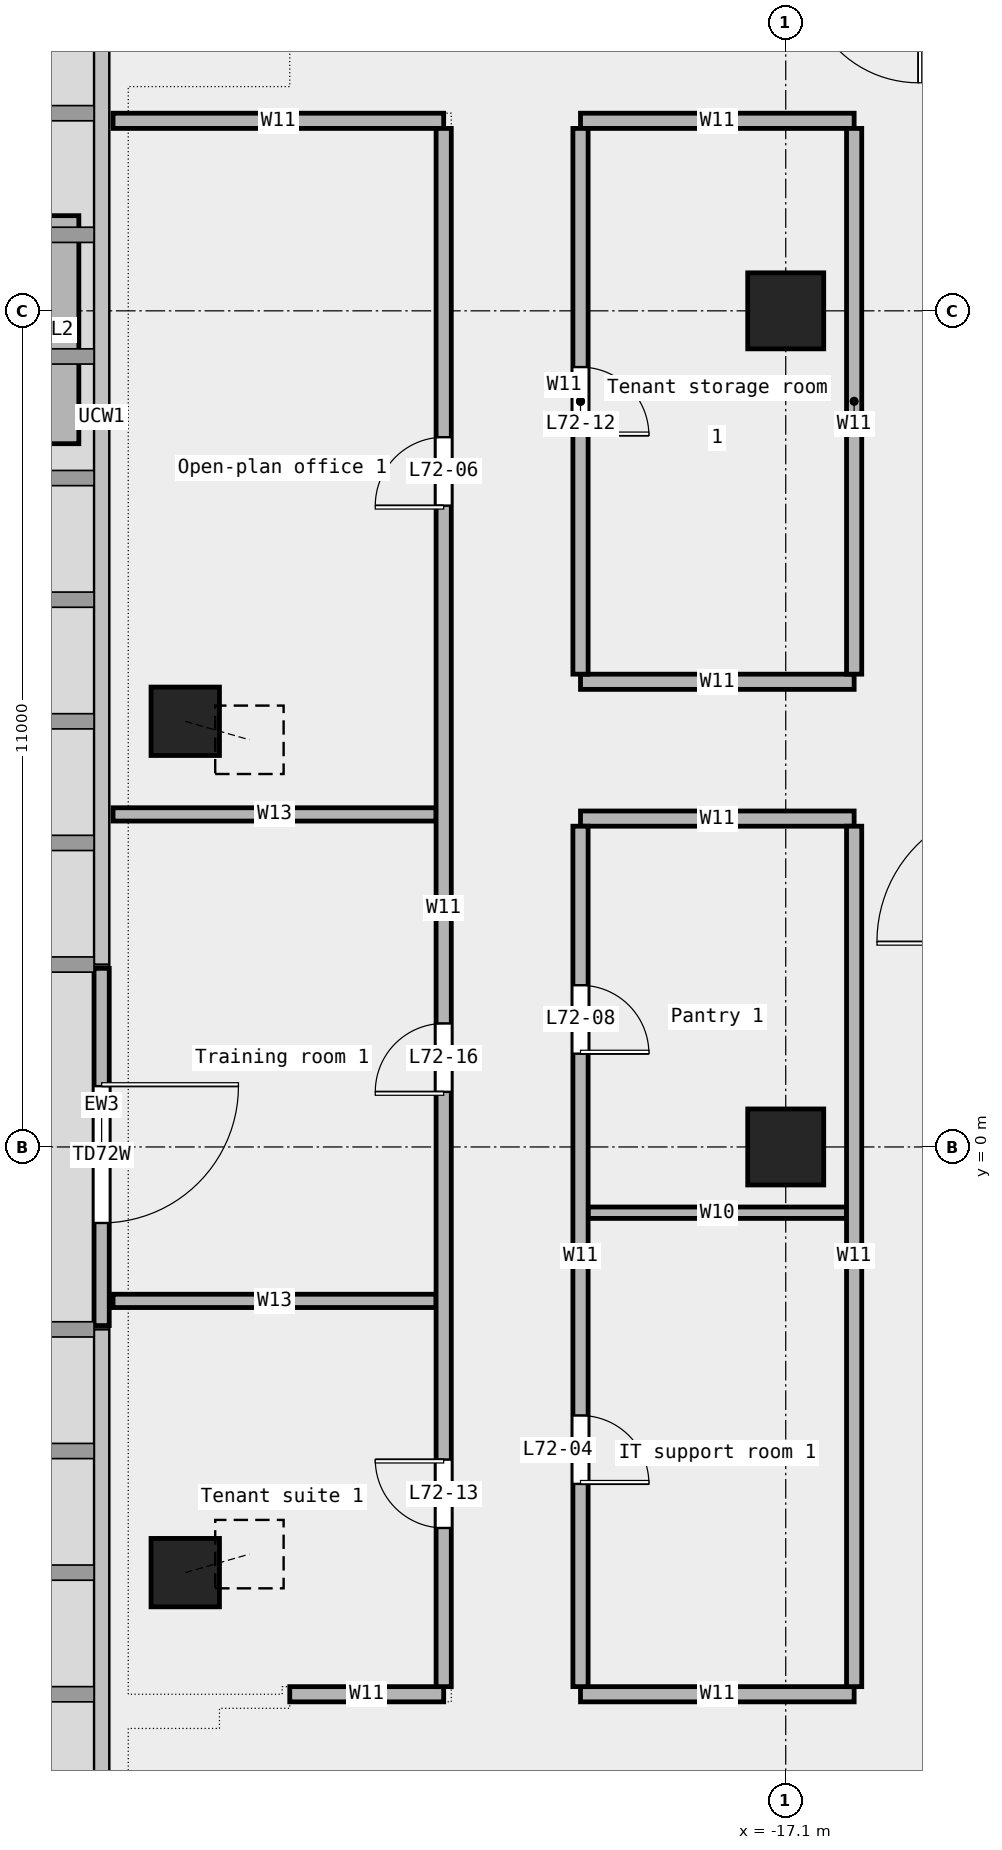
"""IFC4 building model, lengths in metres.
Left out: names, types, materials, properties, quantities, classifications, styles, units other than length and angle.
Written with IfcOpenShell. Run it as: python <this file> out.ifc"""

import sys

from ifc_helpers import new_model, si_unit, direction, frame, frame_2d, origin, origin_2d, place, context, subcontext, project, spatial, rectangle, extrude, element, fill, save


model = new_model("IFC4")
c1 = context("Model", 3, precision=1e-05, world=origin(), true_north=direction((0.0, 1.0)))
c2 = subcontext(c1, "Body", "Model", "MODEL_VIEW")
j1 = project(units=[si_unit("LENGTHUNIT", "METRE"), si_unit("PLANEANGLEUNIT", "RADIAN")], contexts=[c1])
p1 = place(None, origin())
s1 = spatial("IfcSite", under=j1, at=p1, CompositionType="ELEMENT")
p2 = place(p1, origin())
s2 = spatial("IfcBuilding", under=s1, at=p2, CompositionType="ELEMENT")
p3 = place(p2, frame((0.0, 0.0, 329.4)))
s3 = spatial("IfcBuildingStorey", under=s2, at=p3, CompositionType="ELEMENT", Elevation=329.4)
for number, where, z_axis, x_axis in (
    (1, (-25.0, 5.6, 0.0), (0.225, -0.065, 0.972), (0.277, 0.961, 0.0)),
    (2, (-25.0, -5.6, 0.0), (0.225, 0.065, 0.972), (-0.277, 0.961, 0.0)),
):
    element("IfcColumn", number, at=place(p3, frame(where, z_axis=z_axis, x_axis=x_axis)), inside=s3, PredefinedType="COLUMN", context=c2, shape_type="SweptSolid", body=[
        extrude(rectangle(XDim=0.9, YDim=0.9, at=origin_2d()), origin(), (0.0, 0.0, 1.0), 3.754),
    ])
for number, where, z_axis, x_axis in (
    (3, (-17.1, 0.0, 0.0), (0.0, 0.0, 1.0), (1.0, 0.0, 0.0)),
    (4, (-17.1, 11.0, 0.0), (0.0, 0.0, 1.0), (1.0, 0.0, 0.0)),
):
    element("IfcColumn", number, at=place(p3, frame(where, z_axis=z_axis, x_axis=x_axis)), inside=s3, PredefinedType="COLUMN", context=c2, shape_type="SweptSolid", body=[
        extrude(rectangle(XDim=1.0, YDim=1.0, at=origin_2d()), origin(), (0.0, 0.0, 1.0), 3.65),
    ])
p4 = place(p3, frame((-26.1, 2.35, 0.0), z_axis=(0.0, 0.0, 1.0), x_axis=(0.0, -1.0, 0.0)))
e5 = element("IfcWall", 5, at=p4, inside=s3, PredefinedType="STANDARD", context=c2, shape_type="SweptSolid", body=[
    extrude(rectangle(XDim=4.7, YDim=0.2, at=frame_2d((2.35, 0.0))), origin(), (0.0, 0.0, 1.0), 3.65),
])
p5 = place(p4, frame((1.55, 0.0, 0.0)))
e6 = element("IfcOpeningElement", 6, at=p5, cuts=e5, PredefinedType="OPENING", context=c2, shape_type="SweptSolid", body=[
    extrude(rectangle(XDim=1.8, YDim=2.4, at=frame_2d((0.9, 1.2))), frame((0.0, 0.112, 0.0), z_axis=(0.0, -1.0, 0.0), x_axis=(1.0, 0.0, 0.0)), (0.0, 0.0, 1.0), 0.224),
])
p6 = place(p3, frame((-26.7, 12.252, 0.0), z_axis=(0.0, 0.0, 1.0), x_axis=(0.0, -1.0, 0.0)))
e7 = element("IfcWall", 7, at=p6, inside=s3, PredefinedType="STANDARD", context=c2, shape_type="SweptSolid", body=[
    extrude(rectangle(XDim=3.0, YDim=0.6, at=frame_2d((1.5, 0.0))), origin(), (0.0, 0.0, 1.0), 0.7),
])
p7 = place(p3, frame((-23.625, -7.2, 0.0), z_axis=(0.0, 0.0, 1.0), x_axis=(1.0, 0.0, 0.0)))
e8 = element("IfcWall", 8, at=p7, inside=s3, PredefinedType="PARTITIONING", context=c2, shape_type="SweptSolid", body=[
    extrude(rectangle(XDim=2.025, YDim=0.2, at=frame_2d((1.012, 0.0))), origin(), (0.0, 0.0, 1.0), 3.65),
])
p8 = place(p3, frame((-19.8, -7.2, 0.0), z_axis=(0.0, 0.0, 1.0), x_axis=(1.0, 0.0, 0.0)))
e9 = element("IfcWall", 9, at=p8, inside=s3, PredefinedType="PARTITIONING", context=c2, shape_type="SweptSolid", body=[
    extrude(rectangle(XDim=3.6, YDim=0.2, at=frame_2d((1.8, 0.0))), origin(), (0.0, 0.0, 1.0), 3.65),
])
p9 = place(p3, frame((-25.95, -2.025, 0.0), z_axis=(0.0, 0.0, 1.0), x_axis=(1.0, 0.0, 0.0)))
e10 = element("IfcWall", 10, at=p9, inside=s3, PredefinedType="PARTITIONING", context=c2, shape_type="SweptSolid", body=[
    extrude(rectangle(XDim=4.25, YDim=0.175, at=frame_2d((2.125, 0.0))), origin(), (0.0, 0.0, 1.0), 3.65),
])
p10 = place(p3, frame((-19.7, -0.865, 0.0), z_axis=(0.0, 0.0, 1.0), x_axis=(1.0, 0.0, 0.0)))
e11 = element("IfcWall", 11, at=p10, inside=s3, PredefinedType="PARTITIONING", context=c2, shape_type="SweptSolid", body=[
    extrude(rectangle(XDim=3.4, YDim=0.15, at=frame_2d((1.7, 0.0))), origin(), (0.0, 0.0, 1.0), 3.65),
])
p11 = place(p3, frame((-19.8, 4.32, 0.0), z_axis=(0.0, 0.0, 1.0), x_axis=(1.0, 0.0, 0.0)))
e12 = element("IfcWall", 12, at=p11, inside=s3, PredefinedType="PARTITIONING", context=c2, shape_type="SweptSolid", body=[
    extrude(rectangle(XDim=3.6, YDim=0.2, at=frame_2d((1.8, 0.0))), origin(), (0.0, 0.0, 1.0), 3.65),
])
p12 = place(p3, frame((-25.95, 4.375, 0.0), z_axis=(0.0, 0.0, 1.0), x_axis=(1.0, 0.0, 0.0)))
e13 = element("IfcWall", 13, at=p12, inside=s3, PredefinedType="PARTITIONING", context=c2, shape_type="SweptSolid", body=[
    extrude(rectangle(XDim=4.25, YDim=0.175, at=frame_2d((2.125, 0.0))), origin(), (0.0, 0.0, 1.0), 3.65),
])
p13 = place(p3, frame((-19.8, 6.12, 0.0), z_axis=(0.0, 0.0, 1.0), x_axis=(1.0, 0.0, 0.0)))
e14 = element("IfcWall", 14, at=p13, inside=s3, PredefinedType="PARTITIONING", context=c2, shape_type="SweptSolid", body=[
    extrude(rectangle(XDim=3.6, YDim=0.2, at=frame_2d((1.8, 0.0))), origin(), (0.0, 0.0, 1.0), 3.65),
])
p14 = place(p3, frame((-25.95, 13.5, 0.0), z_axis=(0.0, 0.0, 1.0), x_axis=(1.0, 0.0, 0.0)))
e15 = element("IfcWall", 15, at=p14, inside=s3, PredefinedType="PARTITIONING", context=c2, shape_type="SweptSolid", body=[
    extrude(rectangle(XDim=4.35, YDim=0.2, at=frame_2d((2.175, 0.0))), origin(), (0.0, 0.0, 1.0), 3.65),
])
p15 = place(p3, frame((-19.8, 13.5, 0.0), z_axis=(0.0, 0.0, 1.0), x_axis=(1.0, 0.0, 0.0)))
e16 = element("IfcWall", 16, at=p15, inside=s3, PredefinedType="PARTITIONING", context=c2, shape_type="SweptSolid", body=[
    extrude(rectangle(XDim=3.6, YDim=0.2, at=frame_2d((1.8, 0.0))), origin(), (0.0, 0.0, 1.0), 3.65),
])
p16 = place(p3, frame((-21.6, -7.1, 0.0), z_axis=(0.0, 0.0, 1.0), x_axis=(0.0, 1.0, 0.0)))
e17 = element("IfcWall", 17, at=p16, inside=s3, PredefinedType="PARTITIONING", context=c2, shape_type="SweptSolid", body=[
    extrude(rectangle(XDim=20.5, YDim=0.2, at=frame_2d((10.25, 0.0))), origin(), (0.0, 0.0, 1.0), 3.65),
])
p17 = place(p16, frame((15.538, 0.0, 0.0)))
e18 = element("IfcOpeningElement", 18, at=p17, cuts=e17, PredefinedType="OPENING", context=c2, shape_type="SweptSolid", body=[
    extrude(rectangle(XDim=0.9, YDim=2.1, at=frame_2d((0.45, 1.05))), frame((0.0, 0.112, 0.0), z_axis=(0.0, -1.0, 0.0), x_axis=(1.0, 0.0, 0.0)), (0.0, 0.0, 1.0), 0.224),
])
p18 = place(p16, frame((2.087, 0.0, 0.0)))
e19 = element("IfcOpeningElement", 19, at=p18, cuts=e17, PredefinedType="OPENING", context=c2, shape_type="SweptSolid", body=[
    extrude(rectangle(XDim=0.9, YDim=2.1, at=frame_2d((0.45, 1.05))), frame((0.0, 0.112, 0.0), z_axis=(0.0, -1.0, 0.0), x_axis=(1.0, 0.0, 0.0)), (0.0, 0.0, 1.0), 0.224),
])
p19 = place(p16, frame((7.825, 0.0, 0.0)))
e20 = element("IfcOpeningElement", 20, at=p19, cuts=e17, PredefinedType="OPENING", context=c2, shape_type="SweptSolid", body=[
    extrude(rectangle(XDim=0.9, YDim=2.1, at=frame_2d((0.45, 1.05))), frame((0.0, 0.112, 0.0), z_axis=(0.0, -1.0, 0.0), x_axis=(1.0, 0.0, 0.0)), (0.0, 0.0, 1.0), 0.224),
])
p20 = place(p3, frame((-19.8, -7.1, 0.0), z_axis=(0.0, 0.0, 1.0), x_axis=(0.0, 1.0, 0.0)))
e21 = element("IfcWall", 21, at=p20, inside=s3, PredefinedType="PARTITIONING", context=c2, shape_type="SweptSolid", body=[
    extrude(rectangle(XDim=11.32, YDim=0.2, at=frame_2d((5.66, 0.0))), origin(), (0.0, 0.0, 1.0), 3.65),
])
p21 = place(p20, frame((2.667, 0.0, 0.0)))
e22 = element("IfcOpeningElement", 22, at=p21, cuts=e21, PredefinedType="OPENING", context=c2, shape_type="SweptSolid", body=[
    extrude(rectangle(XDim=0.9, YDim=2.1, at=frame_2d((0.45, 1.05))), frame((0.0, 0.112, 0.0), z_axis=(0.0, -1.0, 0.0), x_axis=(1.0, 0.0, 0.0)), (0.0, 0.0, 1.0), 0.224),
])
p22 = place(p20, frame((8.327, 0.0, 0.0)))
e23 = element("IfcOpeningElement", 23, at=p22, cuts=e21, PredefinedType="OPENING", context=c2, shape_type="SweptSolid", body=[
    extrude(rectangle(XDim=0.9, YDim=2.1, at=frame_2d((0.45, 1.05))), frame((0.0, 0.112, 0.0), z_axis=(0.0, -1.0, 0.0), x_axis=(1.0, 0.0, 0.0)), (0.0, 0.0, 1.0), 0.224),
])
p23 = place(p3, frame((-19.8, 6.22, 0.0), z_axis=(0.0, 0.0, 1.0), x_axis=(0.0, 1.0, 0.0)))
e24 = element("IfcWall", 24, at=p23, inside=s3, PredefinedType="PARTITIONING", context=c2, shape_type="SweptSolid", body=[
    extrude(rectangle(XDim=7.18, YDim=0.2, at=frame_2d((3.59, 0.0))), origin(), (0.0, 0.0, 1.0), 3.65),
])
p24 = place(p23, frame((3.14, 0.0, 0.0)))
e25 = element("IfcOpeningElement", 25, at=p24, cuts=e24, PredefinedType="OPENING", context=c2, shape_type="SweptSolid", body=[
    extrude(rectangle(XDim=0.9, YDim=2.1, at=frame_2d((0.45, 1.05))), frame((0.0, 0.112, 0.0), z_axis=(0.0, -1.0, 0.0), x_axis=(1.0, 0.0, 0.0)), (0.0, 0.0, 1.0), 0.224),
])
p25 = place(p3, frame((-16.2, -7.1, 0.0), z_axis=(0.0, 0.0, 1.0), x_axis=(0.0, 1.0, 0.0)))
e26 = element("IfcWall", 26, at=p25, inside=s3, PredefinedType="PARTITIONING", context=c2, shape_type="SweptSolid", body=[
    extrude(rectangle(XDim=11.32, YDim=0.2, at=frame_2d((5.66, 0.0))), origin(), (0.0, 0.0, 1.0), 3.65),
])
p26 = place(p3, frame((-16.2, 6.22, 0.0), z_axis=(0.0, 0.0, 1.0), x_axis=(0.0, 1.0, 0.0)))
e27 = element("IfcWall", 27, at=p26, inside=s3, PredefinedType="PARTITIONING", context=c2, shape_type="SweptSolid", body=[
    extrude(rectangle(XDim=7.18, YDim=0.2, at=frame_2d((3.59, 0.0))), origin(), (0.0, 0.0, 1.0), 3.65),
])
p27 = place(p5, origin())
e28 = element("IfcDoor", 28, at=p27, inside=s3, OperationType="DOUBLE_DOOR_SINGLE_SWING", PredefinedType="DOOR", context=c2, shape_type="SweptSolid", body=[
    extrude(rectangle(XDim=1.8, YDim=2.4, at=frame_2d((0.9, 1.2))), frame((0.0, 0.025, 0.0), z_axis=(0.0, -1.0, 0.0), x_axis=(1.0, 0.0, 0.0)), (0.0, 0.0, 1.0), 0.05),
])
fill(e6, e28)
p28 = place(p21, origin())
e29 = element("IfcDoor", 29, at=p28, inside=s3, OperationType="SINGLE_SWING_RIGHT", PredefinedType="DOOR", context=c2, shape_type="SweptSolid", body=[
    extrude(rectangle(XDim=0.9, YDim=2.1, at=frame_2d((0.45, 1.05))), frame((0.0, 0.025, 0.0), z_axis=(0.0, -1.0, 0.0), x_axis=(1.0, 0.0, 0.0)), (0.0, 0.0, 1.0), 0.05),
])
fill(e22, e29)
p29 = place(p17, origin())
e30 = element("IfcDoor", 30, at=p29, inside=s3, OperationType="SINGLE_SWING_LEFT", PredefinedType="DOOR", context=c2, shape_type="SweptSolid", body=[
    extrude(rectangle(XDim=0.9, YDim=2.1, at=frame_2d((0.45, 1.05))), frame((0.0, 0.025, 0.0), z_axis=(0.0, -1.0, 0.0), x_axis=(1.0, 0.0, 0.0)), (0.0, 0.0, 1.0), 0.05),
])
fill(e18, e30)
p30 = place(p22, origin())
e31 = element("IfcDoor", 31, at=p30, inside=s3, OperationType="SINGLE_SWING_RIGHT", PredefinedType="DOOR", context=c2, shape_type="SweptSolid", body=[
    extrude(rectangle(XDim=0.9, YDim=2.1, at=frame_2d((0.45, 1.05))), frame((0.0, 0.025, 0.0), z_axis=(0.0, -1.0, 0.0), x_axis=(1.0, 0.0, 0.0)), (0.0, 0.0, 1.0), 0.05),
])
fill(e23, e31)
p31 = place(p24, origin())
e32 = element("IfcDoor", 32, at=p31, inside=s3, OperationType="SINGLE_SWING_RIGHT", PredefinedType="DOOR", context=c2, shape_type="SweptSolid", body=[
    extrude(rectangle(XDim=0.9, YDim=2.1, at=frame_2d((0.45, 1.05))), frame((0.0, 0.025, 0.0), z_axis=(0.0, -1.0, 0.0), x_axis=(1.0, 0.0, 0.0)), (0.0, 0.0, 1.0), 0.05),
])
fill(e25, e32)
p32 = place(p18, origin())
e33 = element("IfcDoor", 33, at=p32, inside=s3, OperationType="SINGLE_SWING_RIGHT", PredefinedType="DOOR", context=c2, shape_type="SweptSolid", body=[
    extrude(rectangle(XDim=0.9, YDim=2.1, at=frame_2d((0.45, 1.05))), frame((0.0, 0.025, 0.0), z_axis=(0.0, -1.0, 0.0), x_axis=(1.0, 0.0, 0.0)), (0.0, 0.0, 1.0), 0.05),
])
fill(e19, e33)
p33 = place(p19, origin())
e34 = element("IfcDoor", 34, at=p33, inside=s3, OperationType="SINGLE_SWING_LEFT", PredefinedType="DOOR", context=c2, shape_type="SweptSolid", body=[
    extrude(rectangle(XDim=0.9, YDim=2.1, at=frame_2d((0.45, 1.05))), frame((0.0, 0.025, 0.0), z_axis=(0.0, -1.0, 0.0), x_axis=(1.0, 0.0, 0.0)), (0.0, 0.0, 1.0), 0.05),
])
fill(e20, e34)
save(model, sys.argv[1])
